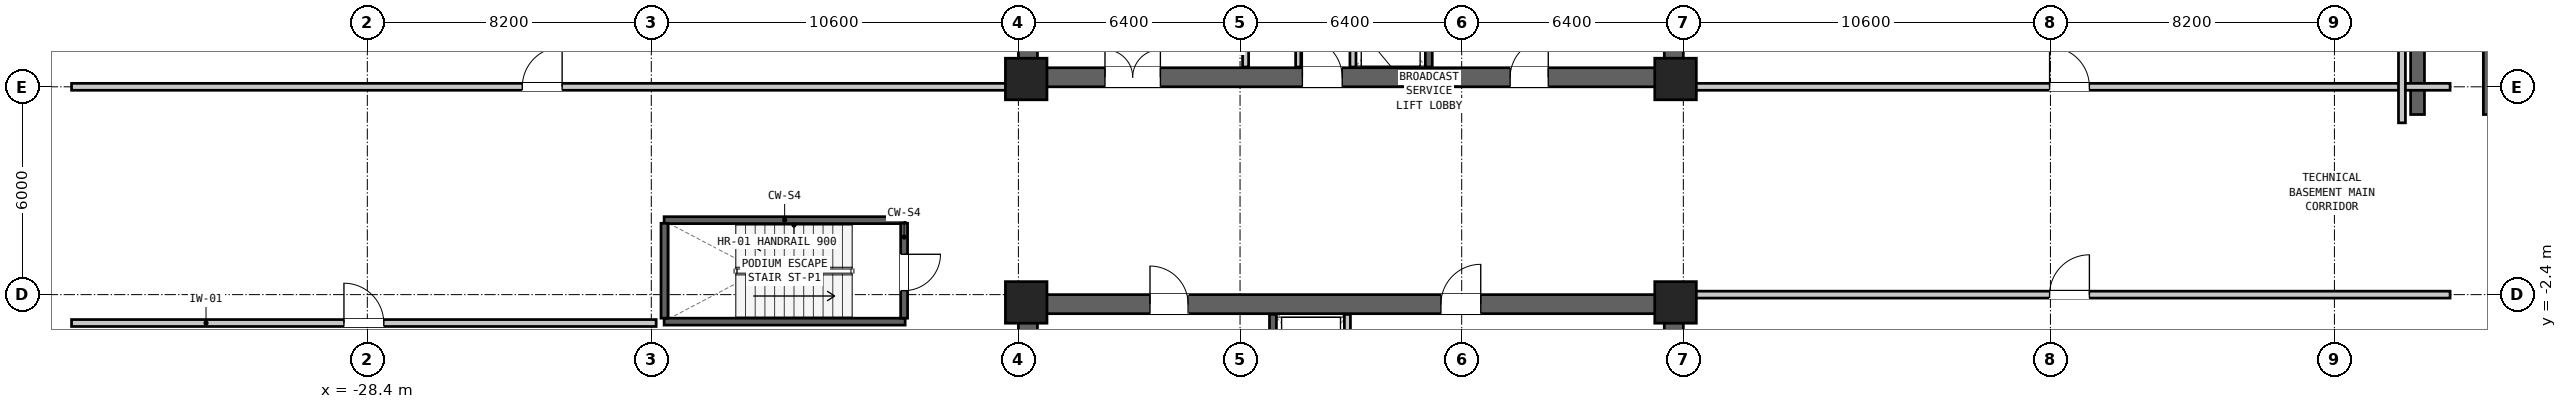
"""IFC4 building model, lengths in metres.
Left out: names, types, materials, properties, quantities, classifications, styles, units other than length and angle.
Written with IfcOpenShell. Run it as: python <this file> out.ifc"""

import sys

from ifc_helpers import new_model, si_unit, direction, frame, frame_2d, origin, origin_2d, place, context, subcontext, project, spatial, rectangle, extrude, element, fill, save


model = new_model("IFC4")
c1 = context("Model", 3, precision=1e-05, world=origin(), true_north=direction((0.0, 1.0)))
c2 = subcontext(c1, "Body", "Model", "MODEL_VIEW")
j1 = project(units=[si_unit("LENGTHUNIT", "METRE"), si_unit("PLANEANGLEUNIT", "RADIAN")], contexts=[c1])
p1 = place(None, origin())
s1 = spatial("IfcSite", under=j1, at=p1, CompositionType="ELEMENT")
p2 = place(p1, origin())
s2 = spatial("IfcBuilding", under=s1, at=p2, CompositionType="ELEMENT")
p3 = place(p2, frame((0.0, 0.0, -4.5)))
s3 = spatial("IfcBuildingStorey", under=s2, at=p3, CompositionType="ELEMENT", Elevation=-4.5)
p4 = place(p3, frame((-9.6, 3.875, 0.0), z_axis=(0.0, 0.0, 1.0), x_axis=(1.0, 0.0, 0.0)))
e1 = element("IfcWall", 1, at=p4, inside=s3, PredefinedType="SHEAR", context=c2, shape_type="SweptSolid", body=[
    extrude(rectangle(XDim=19.2, YDim=0.55, at=frame_2d((9.6, 0.0))), origin(), (0.0, 0.0, 1.0), 4.5),
])
p5 = place(p4, frame((14.2, 0.0, 0.0)))
e2 = element("IfcOpeningElement", 2, at=p5, cuts=e1, PredefinedType="OPENING", context=c2, shape_type="SweptSolid", body=[
    extrude(rectangle(XDim=1.1, YDim=2.08, at=frame_2d((0.55, 1.04))), frame((0.0, 0.287, 0.0), z_axis=(0.0, -1.0, 0.0), x_axis=(1.0, 0.0, 0.0)), (0.0, 0.0, 1.0), 0.574),
])
p6 = place(p4, frame((8.2, 0.0, 0.0)))
e3 = element("IfcOpeningElement", 3, at=p6, cuts=e1, PredefinedType="OPENING", context=c2, shape_type="SweptSolid", body=[
    extrude(rectangle(XDim=1.15, YDim=2.1, at=frame_2d((0.575, 1.05))), frame((0.0, 0.287, 0.0), z_axis=(0.0, -1.0, 0.0), x_axis=(1.0, 0.0, 0.0)), (0.0, 0.0, 1.0), 0.574),
])
p7 = place(p4, frame((2.5, 0.0, 0.0)))
e4 = element("IfcOpeningElement", 4, at=p7, cuts=e1, PredefinedType="OPENING", context=c2, shape_type="SweptSolid", body=[
    extrude(rectangle(XDim=1.6, YDim=2.12, at=frame_2d((0.8, 1.06))), frame((0.0, 0.287, 0.0), z_axis=(0.0, -1.0, 0.0), x_axis=(1.0, 0.0, 0.0)), (0.0, 0.0, 1.0), 0.574),
])
for number, where, z_axis, x_axis in (
    (5, (-9.325, 3.6, 0.0), (0.0, 0.0, 1.0), (0.0, 1.0, 0.0)),
    (6, (9.325, 3.6, 0.0), (0.0, 0.0, 1.0), (0.0, 1.0, 0.0)),
):
    element("IfcWall", number, at=place(p3, frame(where, z_axis=z_axis, x_axis=x_axis)), inside=s3, PredefinedType="SHEAR", context=c2, shape_type="SweptSolid", body=[
        extrude(rectangle(XDim=6.6, YDim=0.55, at=frame_2d((3.3, 0.0))), origin(), (0.0, 0.0, 1.0), 4.5),
    ])
p8 = place(p3, frame((-9.6, -2.675, 0.0), z_axis=(0.0, 0.0, 1.0), x_axis=(1.0, 0.0, 0.0)))
e7 = element("IfcWall", 7, at=p8, inside=s3, PredefinedType="SHEAR", context=c2, shape_type="SweptSolid", body=[
    extrude(rectangle(XDim=19.2, YDim=0.55, at=frame_2d((9.6, 0.0))), origin(), (0.0, 0.0, 1.0), 4.5),
])
p9 = place(p8, frame((3.8, 0.0, 0.0)))
e8 = element("IfcOpeningElement", 8, at=p9, cuts=e7, PredefinedType="OPENING", context=c2, shape_type="SweptSolid", body=[
    extrude(rectangle(XDim=1.1, YDim=2.08, at=frame_2d((0.55, 1.04))), frame((0.0, 0.287, 0.0), z_axis=(0.0, -1.0, 0.0), x_axis=(1.0, 0.0, 0.0)), (0.0, 0.0, 1.0), 0.574),
])
p10 = place(p8, frame((12.2, 0.0, 0.0)))
e9 = element("IfcOpeningElement", 9, at=p10, cuts=e7, PredefinedType="OPENING", context=c2, shape_type="SweptSolid", body=[
    extrude(rectangle(XDim=1.15, YDim=2.1, at=frame_2d((0.575, 1.05))), frame((0.0, 0.287, 0.0), z_axis=(0.0, -1.0, 0.0), x_axis=(1.0, 0.0, 0.0)), (0.0, 0.0, 1.0), 0.574),
])
for number, where, z_axis, x_axis in (
    (10, (-9.325, -9.0, 0.0), (0.0, 0.0, 1.0), (0.0, 1.0, 0.0)),
    (11, (9.325, -9.0, 0.0), (0.0, 0.0, 1.0), (0.0, 1.0, 0.0)),
):
    element("IfcWall", number, at=place(p3, frame(where, z_axis=z_axis, x_axis=x_axis)), inside=s3, PredefinedType="SHEAR", context=c2, shape_type="SweptSolid", body=[
        extrude(rectangle(XDim=6.6, YDim=0.55, at=frame_2d((3.3, 0.0))), origin(), (0.0, 0.0, 1.0), 4.5),
    ])
for number, where, z_axis, x_axis in (
    (12, (-9.375, 3.825, 0.0), (0.0, 0.0, 1.0), (1.0, 0.0, 0.0)),
    (13, (9.375, 3.825, 0.0), (0.0, 0.0, 1.0), (1.0, 0.0, 0.0)),
    (14, (-9.375, -2.625, 0.0), (0.0, 0.0, 1.0), (1.0, 0.0, 0.0)),
    (15, (9.375, -2.625, 0.0), (0.0, 0.0, 1.0), (1.0, 0.0, 0.0)),
):
    element("IfcColumn", number, at=place(p3, frame(where, z_axis=z_axis, x_axis=x_axis)), inside=s3, PredefinedType="COLUMN", context=c2, shape_type="SweptSolid", body=[
        extrude(rectangle(XDim=1.2, YDim=1.2, at=origin_2d()), origin(), (0.0, 0.0, 1.0), 4.5),
    ])
for number, where, z_axis, x_axis in (
    (16, (30.8, 2.8, 0.0), (0.0, 0.0, 1.0), (0.0, 1.0, 0.0)),
    (17, (32.9, 2.8, 0.0), (0.0, 0.0, 1.0), (0.0, 1.0, 0.0)),
):
    element("IfcWall", number, at=place(p3, frame(where, z_axis=z_axis, x_axis=x_axis)), inside=s3, PredefinedType="SHEAR", context=c2, shape_type="SweptSolid", body=[
        extrude(rectangle(XDim=20.3, YDim=0.4, at=frame_2d((10.15, 0.0))), origin(), (0.0, 0.0, 1.0), 4.18),
    ])
p11 = place(p3, frame((2.25, 4.17, 0.0), z_axis=(0.0, 0.0, 1.0), x_axis=(0.0, 1.0, 0.0)))
e18 = element("IfcWall", 18, at=p11, inside=s3, PredefinedType="SHEAR", context=c2, shape_type="SweptSolid", body=[
    extrude(rectangle(XDim=5.46, YDim=0.2, at=frame_2d((2.73, 0.0))), origin(), (0.0, 0.0, 1.0), 4.18),
])
p12 = place(p11, frame((0.65, 0.0, 0.0)))
e19 = element("IfcOpeningElement", 19, at=p12, cuts=e18, PredefinedType="OPENING", context=c2, shape_type="SweptSolid", body=[
    extrude(rectangle(XDim=1.15, YDim=2.08, at=frame_2d((0.575, 1.04))), frame((0.0, 0.112, 0.0), z_axis=(0.0, -1.0, 0.0), x_axis=(1.0, 0.0, 0.0)), (0.0, 0.0, 1.0), 0.224),
])
p13 = place(p3, frame((0.06, 4.17, 0.0), z_axis=(0.0, 0.0, 1.0), x_axis=(0.0, 1.0, 0.0)))
e20 = element("IfcWall", 20, at=p13, inside=s3, PredefinedType="PARTITIONING", context=c2, shape_type="SweptSolid", body=[
    extrude(rectangle(XDim=5.46, YDim=0.175, at=frame_2d((2.73, 0.0))), origin(), (0.0, 0.0, 1.0), 4.18),
])
p14 = place(p13, frame((3.05, 0.0, 0.0)))
e21 = element("IfcOpeningElement", 21, at=p14, cuts=e20, PredefinedType="OPENING", context=c2, shape_type="SweptSolid", body=[
    extrude(rectangle(XDim=1.4, YDim=2.12, at=frame_2d((0.7, 1.06))), frame((0.0, 0.1, 0.0), z_axis=(0.0, -1.0, 0.0), x_axis=(1.0, 0.0, 0.0)), (0.0, 0.0, 1.0), 0.199),
])
p15 = place(p3, frame((-3.04, 4.17, 0.0), z_axis=(0.0, 0.0, 1.0), x_axis=(0.0, 1.0, 0.0)))
e22 = element("IfcWall", 22, at=p15, inside=s3, PredefinedType="PARTITIONING", context=c2, shape_type="SweptSolid", body=[
    extrude(rectangle(XDim=5.46, YDim=0.175, at=frame_2d((2.73, 0.0))), origin(), (0.0, 0.0, 1.0), 4.18),
])
p16 = place(p3, frame((-1.52, 4.17, 0.0), z_axis=(0.0, 0.0, 1.0), x_axis=(0.0, 1.0, 0.0)))
e23 = element("IfcWall", 23, at=p16, inside=s3, PredefinedType="PARTITIONING", context=c2, shape_type="SweptSolid", body=[
    extrude(rectangle(XDim=5.46, YDim=0.15, at=frame_2d((2.73, 0.0))), origin(), (0.0, 0.0, 1.0), 4.18),
])
p17 = place(p16, frame((4.33, 0.0, 0.0)))
e24 = element("IfcOpeningElement", 24, at=p17, cuts=e23, PredefinedType="OPENING", context=c2, shape_type="SweptSolid", body=[
    extrude(rectangle(XDim=0.9, YDim=2.05, at=frame_2d((0.45, 1.025))), frame((0.0, 0.087, 0.0), z_axis=(0.0, -1.0, 0.0), x_axis=(1.0, 0.0, 0.0)), (0.0, 0.0, 1.0), 0.174),
])
p18 = place(p16, frame((0.65, 0.0, 0.0)))
e25 = element("IfcOpeningElement", 25, at=p18, cuts=e23, PredefinedType="OPENING", context=c2, shape_type="SweptSolid", body=[
    extrude(rectangle(XDim=0.9, YDim=2.05, at=frame_2d((0.45, 1.025))), frame((0.0, 0.087, 0.0), z_axis=(0.0, -1.0, 0.0), x_axis=(1.0, 0.0, 0.0)), (0.0, 0.0, 1.0), 0.174),
])
p19 = place(p3, frame((-2.25, -8.43, 0.0), z_axis=(0.0, 0.0, 1.0), x_axis=(0.0, 1.0, 0.0)))
e26 = element("IfcWall", 26, at=p19, inside=s3, PredefinedType="SHEAR", context=c2, shape_type="SweptSolid", body=[
    extrude(rectangle(XDim=5.46, YDim=0.2, at=frame_2d((2.73, 0.0))), origin(), (0.0, 0.0, 1.0), 4.18),
])
p20 = place(p19, frame((3.3, 0.0, 0.0)))
e27 = element("IfcOpeningElement", 27, at=p20, cuts=e26, PredefinedType="OPENING", context=c2, shape_type="SweptSolid", body=[
    extrude(rectangle(XDim=1.15, YDim=2.08, at=frame_2d((0.575, 1.04))), frame((0.0, 0.112, 0.0), z_axis=(0.0, -1.0, 0.0), x_axis=(1.0, 0.0, 0.0)), (0.0, 0.0, 1.0), 0.224),
])
p21 = place(p3, frame((-0.1, -8.43, 0.0), z_axis=(0.0, 0.0, 1.0), x_axis=(0.0, 1.0, 0.0)))
e28 = element("IfcWall", 28, at=p21, inside=s3, PredefinedType="PARTITIONING", context=c2, shape_type="SweptSolid", body=[
    extrude(rectangle(XDim=5.46, YDim=0.175, at=frame_2d((2.73, 0.0))), origin(), (0.0, 0.0, 1.0), 4.18),
])
p22 = place(p21, frame((0.45, 0.0, 0.0)))
e29 = element("IfcOpeningElement", 29, at=p22, cuts=e28, PredefinedType="OPENING", context=c2, shape_type="SweptSolid", body=[
    extrude(rectangle(XDim=0.9, YDim=2.05, at=frame_2d((0.45, 1.025))), frame((0.0, 0.1, 0.0), z_axis=(0.0, -1.0, 0.0), x_axis=(1.0, 0.0, 0.0)), (0.0, 0.0, 1.0), 0.199),
])
for number, where, z_axis, x_axis in (
    (30, (-19.83, -0.25, 0.0), (0.0, 0.0, 1.0), (1.0, 0.0, 0.0)),
    (31, (-19.83, -3.18, 0.0), (0.0, 0.0, 1.0), (1.0, 0.0, 0.0)),
):
    element("IfcWall", number, at=place(p3, frame(where, z_axis=z_axis, x_axis=x_axis)), inside=s3, PredefinedType="SHEAR", context=c2, shape_type="SweptSolid", body=[
        extrude(rectangle(XDim=6.96, YDim=0.2, at=frame_2d((3.48, 0.0))), origin(), (0.0, 0.0, 1.0), 4.18),
    ])
p23 = place(p3, frame((-12.9, -0.34, 0.0), z_axis=(0.0, 0.0, 1.0), x_axis=(0.0, -1.0, 0.0)))
e32 = element("IfcWall", 32, at=p23, inside=s3, PredefinedType="SHEAR", context=c2, shape_type="SweptSolid", body=[
    extrude(rectangle(XDim=2.74, YDim=0.2, at=frame_2d((1.37, 0.0))), origin(), (0.0, 0.0, 1.0), 4.18),
])
p24 = place(p23, frame((0.895, 0.0, 0.0)))
e33 = element("IfcOpeningElement", 33, at=p24, cuts=e32, PredefinedType="OPENING", context=c2, shape_type="SweptSolid", body=[
    extrude(rectangle(XDim=1.05, YDim=2.08, at=frame_2d((0.525, 1.04))), frame((0.0, 0.112, 0.0), z_axis=(0.0, -1.0, 0.0), x_axis=(1.0, 0.0, 0.0)), (0.0, 0.0, 1.0), 0.224),
])
p25 = place(p3, frame((-19.82, -3.08, 0.0), z_axis=(0.0, 0.0, 1.0), x_axis=(0.0, 1.0, 0.0)))
e34 = element("IfcWall", 34, at=p25, inside=s3, PredefinedType="SHEAR", context=c2, shape_type="SweptSolid", body=[
    extrude(rectangle(XDim=2.74, YDim=0.2, at=frame_2d((1.37, 0.0))), origin(), (0.0, 0.0, 1.0), 4.18),
])
p26 = place(p3, frame((-36.94, -3.22, 0.0), z_axis=(0.0, 0.0, 1.0), x_axis=(1.0, 0.0, 0.0)))
e35 = element("IfcWall", 35, at=p26, inside=s3, PredefinedType="PARTITIONING", context=c2, shape_type="SweptSolid", body=[
    extrude(rectangle(XDim=16.88, YDim=0.2, at=frame_2d((8.44, 0.0))), origin(), (0.0, 0.0, 1.0), 3.042),
])
p27 = place(p26, frame((7.865, 0.0, 0.0)))
e36 = element("IfcOpeningElement", 36, at=p27, cuts=e35, PredefinedType="OPENING", context=c2, shape_type="SweptSolid", body=[
    extrude(rectangle(XDim=1.15, YDim=2.1, at=frame_2d((0.575, 1.05))), frame((0.0, 0.112, 0.0), z_axis=(0.0, -1.0, 0.0), x_axis=(1.0, 0.0, 0.0)), (0.0, 0.0, 1.0), 0.224),
])
p28 = place(p3, frame((9.76, -2.4, 0.0), z_axis=(0.0, 0.0, 1.0), x_axis=(1.0, 0.0, 0.0)))
e37 = element("IfcWall", 37, at=p28, inside=s3, PredefinedType="PARTITIONING", context=c2, shape_type="SweptSolid", body=[
    extrude(rectangle(XDim=21.98, YDim=0.2, at=frame_2d((10.99, 0.0))), origin(), (0.0, 0.0, 1.0), 3.042),
])
p29 = place(p28, frame((10.415, 0.0, 0.0)))
e38 = element("IfcOpeningElement", 38, at=p29, cuts=e37, PredefinedType="OPENING", context=c2, shape_type="SweptSolid", body=[
    extrude(rectangle(XDim=1.15, YDim=2.1, at=frame_2d((0.575, 1.05))), frame((0.0, 0.112, 0.0), z_axis=(0.0, -1.0, 0.0), x_axis=(1.0, 0.0, 0.0)), (0.0, 0.0, 1.0), 0.224),
])
p30 = place(p3, frame((-36.94, 3.6, 0.0), z_axis=(0.0, 0.0, 1.0), x_axis=(1.0, 0.0, 0.0)))
e39 = element("IfcWall", 39, at=p30, inside=s3, PredefinedType="PARTITIONING", context=c2, shape_type="SweptSolid", body=[
    extrude(rectangle(XDim=27.18, YDim=0.2, at=frame_2d((13.59, 0.0))), origin(), (0.0, 0.0, 1.0), 3.042),
])
p31 = place(p30, frame((13.015, 0.0, 0.0)))
e40 = element("IfcOpeningElement", 40, at=p31, cuts=e39, PredefinedType="OPENING", context=c2, shape_type="SweptSolid", body=[
    extrude(rectangle(XDim=1.15, YDim=2.1, at=frame_2d((0.575, 1.05))), frame((0.0, 0.112, 0.0), z_axis=(0.0, -1.0, 0.0), x_axis=(1.0, 0.0, 0.0)), (0.0, 0.0, 1.0), 0.224),
])
p32 = place(p3, frame((9.76, 3.6, 0.0), z_axis=(0.0, 0.0, 1.0), x_axis=(1.0, 0.0, 0.0)))
e41 = element("IfcWall", 41, at=p32, inside=s3, PredefinedType="PARTITIONING", context=c2, shape_type="SweptSolid", body=[
    extrude(rectangle(XDim=21.98, YDim=0.2, at=frame_2d((10.99, 0.0))), origin(), (0.0, 0.0, 1.0), 3.042),
])
p33 = place(p32, frame((10.415, 0.0, 0.0)))
e42 = element("IfcOpeningElement", 42, at=p33, cuts=e41, PredefinedType="OPENING", context=c2, shape_type="SweptSolid", body=[
    extrude(rectangle(XDim=1.15, YDim=2.1, at=frame_2d((0.575, 1.05))), frame((0.0, 0.112, 0.0), z_axis=(0.0, -1.0, 0.0), x_axis=(1.0, 0.0, 0.0)), (0.0, 0.0, 1.0), 0.224),
])
p34 = place(p3, frame((30.35, 2.56, 0.0), z_axis=(0.0, 0.0, 1.0), x_axis=(0.0, 1.0, 0.0)))
e43 = element("IfcWall", 43, at=p34, inside=s3, PredefinedType="PARTITIONING", context=c2, shape_type="SweptSolid", body=[
    extrude(rectangle(XDim=24.88, YDim=0.2, at=frame_2d((12.44, 0.0))), origin(), (0.0, 0.0, 1.0), 4.18),
])
p35 = place(p5, origin())
e44 = element("IfcDoor", 44, at=p35, inside=s3, OperationType="SINGLE_SWING_RIGHT", PredefinedType="DOOR", context=c2, shape_type="SweptSolid", body=[
    extrude(rectangle(XDim=1.1, YDim=2.08, at=frame_2d((0.55, 1.04))), frame((0.0, 0.025, 0.0), z_axis=(0.0, -1.0, 0.0), x_axis=(1.0, 0.0, 0.0)), (0.0, 0.0, 1.0), 0.05),
])
fill(e2, e44)
p36 = place(p6, origin())
e45 = element("IfcDoor", 45, at=p36, inside=s3, OperationType="SINGLE_SWING_LEFT", PredefinedType="DOOR", context=c2, shape_type="SweptSolid", body=[
    extrude(rectangle(XDim=1.15, YDim=2.1, at=frame_2d((0.575, 1.05))), frame((0.0, 0.025, 0.0), z_axis=(0.0, -1.0, 0.0), x_axis=(1.0, 0.0, 0.0)), (0.0, 0.0, 1.0), 0.05),
])
fill(e3, e45)
p37 = place(p7, origin())
e46 = element("IfcDoor", 46, at=p37, inside=s3, OperationType="DOUBLE_DOOR_SINGLE_SWING", PredefinedType="DOOR", context=c2, shape_type="SweptSolid", body=[
    extrude(rectangle(XDim=1.6, YDim=2.12, at=frame_2d((0.8, 1.06))), frame((0.0, 0.025, 0.0), z_axis=(0.0, -1.0, 0.0), x_axis=(1.0, 0.0, 0.0)), (0.0, 0.0, 1.0), 0.05),
])
fill(e4, e46)
p38 = place(p9, origin())
e47 = element("IfcDoor", 47, at=p38, inside=s3, OperationType="SINGLE_SWING_LEFT", PredefinedType="DOOR", context=c2, shape_type="SweptSolid", body=[
    extrude(rectangle(XDim=1.1, YDim=2.08, at=frame_2d((0.55, 1.04))), frame((0.0, 0.025, 0.0), z_axis=(0.0, -1.0, 0.0), x_axis=(1.0, 0.0, 0.0)), (0.0, 0.0, 1.0), 0.05),
])
fill(e8, e47)
p39 = place(p10, origin())
e48 = element("IfcDoor", 48, at=p39, inside=s3, OperationType="SINGLE_SWING_RIGHT", PredefinedType="DOOR", context=c2, shape_type="SweptSolid", body=[
    extrude(rectangle(XDim=1.15, YDim=2.1, at=frame_2d((0.575, 1.05))), frame((0.0, 0.025, 0.0), z_axis=(0.0, -1.0, 0.0), x_axis=(1.0, 0.0, 0.0)), (0.0, 0.0, 1.0), 0.05),
])
fill(e9, e48)
p40 = place(p24, origin())
e49 = element("IfcDoor", 49, at=p40, inside=s3, OperationType="SINGLE_SWING_LEFT", PredefinedType="DOOR", context=c2, shape_type="SweptSolid", body=[
    extrude(rectangle(XDim=1.05, YDim=2.08, at=frame_2d((0.525, 1.04))), frame((0.0, 0.025, 0.0), z_axis=(0.0, -1.0, 0.0), x_axis=(1.0, 0.0, 0.0)), (0.0, 0.0, 1.0), 0.05),
])
fill(e33, e49)
p41 = place(p27, origin())
e50 = element("IfcDoor", 50, at=p41, inside=s3, OperationType="SINGLE_SWING_LEFT", PredefinedType="DOOR", context=c2, shape_type="SweptSolid", body=[
    extrude(rectangle(XDim=1.15, YDim=2.1, at=frame_2d((0.575, 1.05))), frame((0.0, 0.025, 0.0), z_axis=(0.0, -1.0, 0.0), x_axis=(1.0, 0.0, 0.0)), (0.0, 0.0, 1.0), 0.05),
])
fill(e36, e50)
p42 = place(p29, origin())
e51 = element("IfcDoor", 51, at=p42, inside=s3, OperationType="SINGLE_SWING_RIGHT", PredefinedType="DOOR", context=c2, shape_type="SweptSolid", body=[
    extrude(rectangle(XDim=1.15, YDim=2.1, at=frame_2d((0.575, 1.05))), frame((0.0, 0.025, 0.0), z_axis=(0.0, -1.0, 0.0), x_axis=(1.0, 0.0, 0.0)), (0.0, 0.0, 1.0), 0.05),
])
fill(e38, e51)
p43 = place(p31, origin())
e52 = element("IfcDoor", 52, at=p43, inside=s3, OperationType="SINGLE_SWING_RIGHT", PredefinedType="DOOR", context=c2, shape_type="SweptSolid", body=[
    extrude(rectangle(XDim=1.15, YDim=2.1, at=frame_2d((0.575, 1.05))), frame((0.0, 0.025, 0.0), z_axis=(0.0, -1.0, 0.0), x_axis=(1.0, 0.0, 0.0)), (0.0, 0.0, 1.0), 0.05),
])
fill(e40, e52)
p44 = place(p33, origin())
e53 = element("IfcDoor", 53, at=p44, inside=s3, OperationType="SINGLE_SWING_LEFT", PredefinedType="DOOR", context=c2, shape_type="SweptSolid", body=[
    extrude(rectangle(XDim=1.15, YDim=2.1, at=frame_2d((0.575, 1.05))), frame((0.0, 0.025, 0.0), z_axis=(0.0, -1.0, 0.0), x_axis=(1.0, 0.0, 0.0)), (0.0, 0.0, 1.0), 0.05),
])
fill(e42, e53)
save(model, sys.argv[1])
